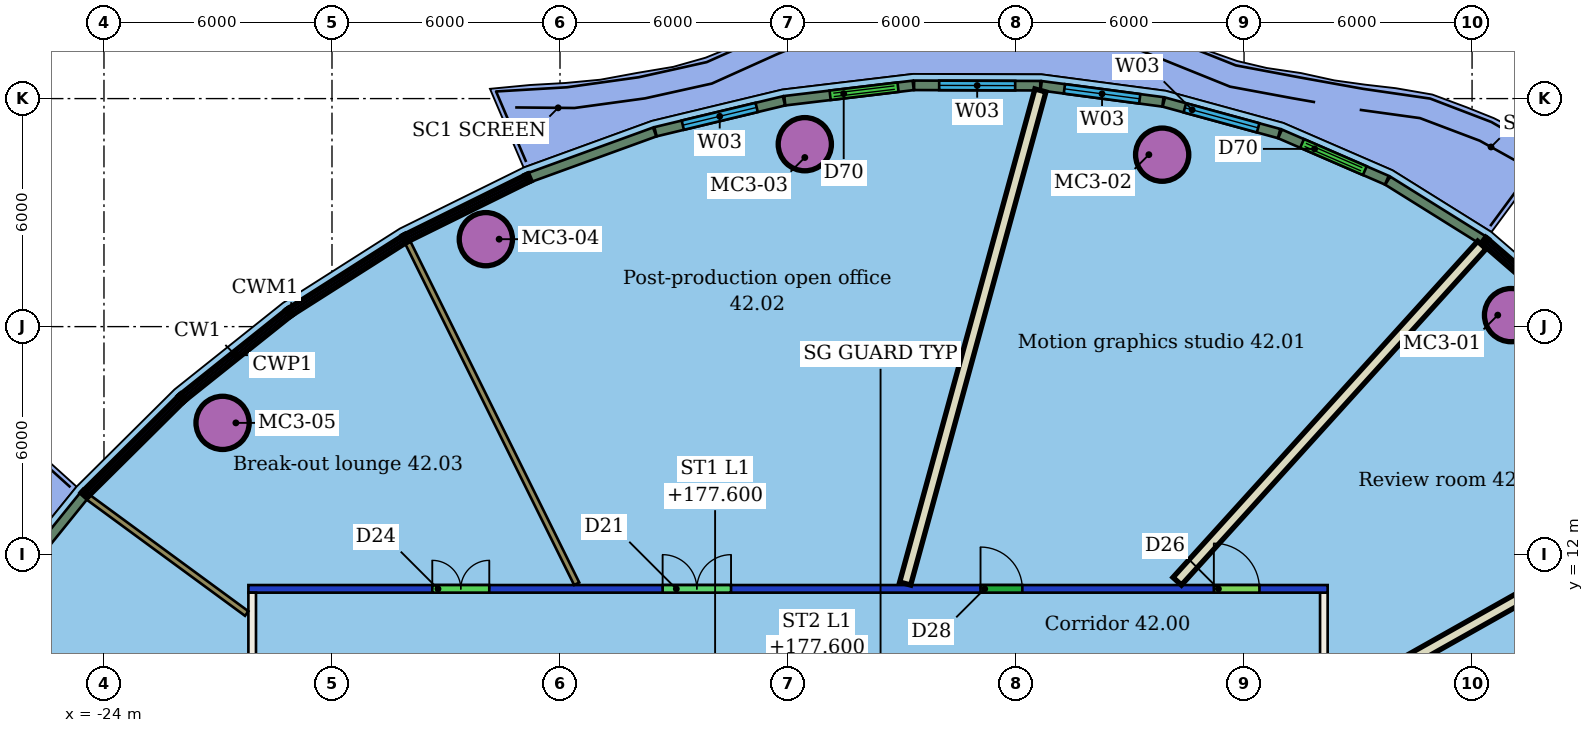
"""IFC4 building model, lengths in metres.
Left out: names, types, materials, properties, quantities, classifications, styles, units other than length and angle.
Written with IfcOpenShell. Run it as: python <this file> out.ifc"""

import sys

from ifc_helpers import new_model, si_unit, direction, frame, frame_2d, origin, origin_2d, place, context, subcontext, project, spatial, rectangle, hollow_circle, extrude, element, fill, save


model = new_model("IFC4")
c1 = context("Model", 3, precision=1e-05, world=origin(), true_north=direction((0.0, 1.0)))
c2 = subcontext(c1, "Body", "Model", "MODEL_VIEW")
j1 = project(units=[si_unit("LENGTHUNIT", "METRE"), si_unit("PLANEANGLEUNIT", "RADIAN")], contexts=[c1])
p1 = place(None, origin())
s1 = spatial("IfcSite", under=j1, at=p1, CompositionType="ELEMENT")
p2 = place(p1, origin())
s2 = spatial("IfcBuilding", under=s1, at=p2, CompositionType="ELEMENT")
p3 = place(p2, frame((0.0, 0.0, 175.8)))
s3 = spatial("IfcBuildingStorey", under=s2, at=p3, CompositionType="ELEMENT", Elevation=175.8)
for number, where, z_axis, x_axis in (
    (1, (13.026, 18.303, 0.0), (0.0, 0.0, 1.0), (1.0, 0.0, 0.0)),
    (2, (3.845, 22.524, 0.0), (0.0, 0.0, 1.0), (1.0, 0.0, 0.0)),
    (3, (-5.558, 22.8, 0.0), (0.0, 0.0, 1.0), (1.0, 0.0, 0.0)),
    (4, (-13.952, 20.301, 0.0), (0.0, 0.0, 1.0), (1.0, 0.0, 0.0)),
    (5, (-20.879, 15.467, 0.0), (0.0, 0.0, 1.0), (1.0, 0.0, 0.0)),
):
    element("IfcColumn", number, at=place(p3, frame(where, z_axis=z_axis, x_axis=x_axis)), inside=s3, PredefinedType="COLUMN", context=c2, shape_type="SweptSolid", body=[
        extrude(hollow_circle(Radius=0.7, WallThickness=0.05, at=origin_2d()), origin(), (0.0, 0.0, 1.0), 3.4),
    ])
p4 = place(p3, frame((-20.1, -11.0, 0.0), z_axis=(0.0, 0.0, 1.0), x_axis=(0.0, 1.0, 0.0)))
e6 = element("IfcWall", 6, at=p4, inside=s3, PredefinedType="PARTITIONING", context=c2, shape_type="SweptSolid", body=[
    extrude(rectangle(XDim=22.0, YDim=0.2, at=frame_2d((11.0, 0.0))), origin(), (0.0, 0.0, 1.0), 3.4),
])
p5 = place(p4, frame((16.019, 0.0, 0.0)))
e7 = element("IfcOpeningElement", 7, at=p5, cuts=e6, PredefinedType="OPENING", context=c2, shape_type="SweptSolid", body=[
    extrude(rectangle(XDim=0.9, YDim=2.1, at=frame_2d((0.45, 1.05))), frame((0.0, 0.11, 0.0), z_axis=(0.0, -1.0, 0.0), x_axis=(1.0, 0.0, 0.0)), (0.0, 0.0, 1.0), 0.22),
])
p6 = place(p4, frame((8.662, 0.0, 0.0)))
e8 = element("IfcOpeningElement", 8, at=p6, cuts=e6, PredefinedType="OPENING", context=c2, shape_type="SweptSolid", body=[
    extrude(rectangle(XDim=1.2, YDim=2.1, at=frame_2d((0.6, 1.05))), frame((0.0, 0.11, 0.0), z_axis=(0.0, -1.0, 0.0), x_axis=(1.0, 0.0, 0.0)), (0.0, 0.0, 1.0), 0.22),
])
p7 = place(p3, frame((-20.2, 11.1, 0.0), z_axis=(0.0, 0.0, 1.0), x_axis=(1.0, 0.0, 0.0)))
e9 = element("IfcWall", 9, at=p7, inside=s3, PredefinedType="PARTITIONING", context=c2, shape_type="SweptSolid", body=[
    extrude(rectangle(XDim=28.4, YDim=0.2, at=frame_2d((14.2, 0.0))), origin(), (0.0, 0.0, 1.0), 3.0),
])
p8 = place(p7, frame((19.265, 0.0, 0.0)))
e10 = element("IfcOpeningElement", 10, at=p8, cuts=e9, PredefinedType="OPENING", context=c2, shape_type="SweptSolid", body=[
    extrude(rectangle(XDim=1.1, YDim=2.1, at=frame_2d((0.55, 1.05))), frame((0.0, 0.11, 0.0), z_axis=(0.0, -1.0, 0.0), x_axis=(1.0, 0.0, 0.0)), (0.0, 0.0, 1.0), 0.22),
])
p9 = place(p7, frame((10.901, 0.0, 0.0)))
e11 = element("IfcOpeningElement", 11, at=p9, cuts=e9, PredefinedType="OPENING", context=c2, shape_type="SweptSolid", body=[
    extrude(rectangle(XDim=1.8, YDim=2.1, at=frame_2d((0.9, 1.05))), frame((0.0, 0.11, 0.0), z_axis=(0.0, -1.0, 0.0), x_axis=(1.0, 0.0, 0.0)), (0.0, 0.0, 1.0), 0.22),
])
p10 = place(p7, frame((4.839, 0.0, 0.0)))
e12 = element("IfcOpeningElement", 12, at=p10, cuts=e9, PredefinedType="OPENING", context=c2, shape_type="SweptSolid", body=[
    extrude(rectangle(XDim=1.5, YDim=2.1, at=frame_2d((0.75, 1.05))), frame((0.0, 0.11, 0.0), z_axis=(0.0, -1.0, 0.0), x_axis=(1.0, 0.0, 0.0)), (0.0, 0.0, 1.0), 0.22),
])
p11 = place(p7, frame((25.405, 0.0, 0.0)))
e13 = element("IfcOpeningElement", 13, at=p11, cuts=e9, PredefinedType="OPENING", context=c2, shape_type="SweptSolid", body=[
    extrude(rectangle(XDim=1.2, YDim=2.1, at=frame_2d((0.6, 1.05))), frame((0.0, 0.11, 0.0), z_axis=(0.0, -1.0, 0.0), x_axis=(1.0, 0.0, 0.0)), (0.0, 0.0, 1.0), 0.22),
])
p12 = place(p3, frame((8.1, 11.0, 0.0), z_axis=(0.0, 0.0, 1.0), x_axis=(0.0, -1.0, 0.0)))
e14 = element("IfcWall", 14, at=p12, inside=s3, PredefinedType="PARTITIONING", context=c2, shape_type="SweptSolid", body=[
    extrude(rectangle(XDim=22.0, YDim=0.2, at=frame_2d((11.0, 0.0))), origin(), (0.0, 0.0, 1.0), 3.4),
])
p13 = place(p12, frame((15.112, 0.0, 0.0)))
e15 = element("IfcOpeningElement", 15, at=p13, cuts=e14, PredefinedType="OPENING", context=c2, shape_type="SweptSolid", body=[
    extrude(rectangle(XDim=0.9, YDim=2.1, at=frame_2d((0.45, 1.05))), frame((0.0, 0.11, 0.0), z_axis=(0.0, -1.0, 0.0), x_axis=(1.0, 0.0, 0.0)), (0.0, 0.0, 1.0), 0.22),
])
p14 = place(p12, frame((11.66, 0.0, 0.0)))
e16 = element("IfcOpeningElement", 16, at=p14, cuts=e14, PredefinedType="OPENING", context=c2, shape_type="SweptSolid", body=[
    extrude(rectangle(XDim=1.2, YDim=2.1, at=frame_2d((0.6, 1.05))), frame((0.0, 0.11, 0.0), z_axis=(0.0, -1.0, 0.0), x_axis=(1.0, 0.0, 0.0)), (0.0, 0.0, 1.0), 0.22),
])
p15 = place(p12, frame((5.034, 0.0, 0.0)))
e17 = element("IfcOpeningElement", 17, at=p15, cuts=e14, PredefinedType="OPENING", context=c2, shape_type="SweptSolid", body=[
    extrude(rectangle(XDim=1.0, YDim=2.1, at=frame_2d((0.5, 1.05))), frame((0.0, 0.11, 0.0), z_axis=(0.0, -1.0, 0.0), x_axis=(1.0, 0.0, 0.0)), (0.0, 0.0, 1.0), 0.22),
])
p16 = place(p3, frame((12.258, 20.146, 0.0), z_axis=(0.0, 0.0, 1.0), x_axis=(-0.671538022576, -0.740970096721, 0.0)))
e18 = element("IfcWall", 18, at=p16, inside=s3, PredefinedType="PARTITIONING", context=c2, shape_type="SweptSolid", body=[
    extrude(rectangle(XDim=11.938, YDim=0.3, at=frame_2d((5.969, 0.0))), origin(), (0.0, 0.0, 1.0), 3.4),
])
p17 = place(p3, frame((0.641, 24.214, 0.0), z_axis=(0.0, 0.0, 1.0), x_axis=(-0.264514468867, -0.964381716832, 0.0)))
e19 = element("IfcWall", 19, at=p17, inside=s3, PredefinedType="PARTITIONING", context=c2, shape_type="SweptSolid", body=[
    extrude(rectangle(XDim=13.453, YDim=0.3, at=frame_2d((6.727, 0.0))), origin(), (0.0, 0.0, 1.0), 3.4),
])
p18 = place(p3, frame((-16.004, 20.209, 0.0), z_axis=(0.0, 0.0, 1.0), x_axis=(0.443651290201, -0.896199493809, 0.0)))
e20 = element("IfcWall", 20, at=p18, inside=s3, PredefinedType="PARTITIONING", context=c2, shape_type="SweptSolid", body=[
    extrude(rectangle(XDim=10.016, YDim=0.15, at=frame_2d((5.008, 0.0))), origin(), (0.0, 0.0, 1.0), 3.4),
])
p19 = place(p3, frame((-24.406, 13.504, 0.0), z_axis=(0.0, 0.0, 1.0), x_axis=(0.806278661404, -0.591535899303, 0.0)))
e21 = element("IfcWall", 21, at=p19, inside=s3, PredefinedType="PARTITIONING", context=c2, shape_type="SweptSolid", body=[
    extrude(rectangle(XDim=5.162, YDim=0.15, at=frame_2d((2.581, 0.0))), origin(), (0.0, 0.0, 1.0), 3.4),
])
p20 = place(p3, frame((17.885, 13.463, 0.0), z_axis=(0.0, 0.0, 1.0), x_axis=(-0.871144981066, -0.491025887265, 0.0)))
e22 = element("IfcWall", 22, at=p20, inside=s3, PredefinedType="PARTITIONING", context=c2, shape_type="SweptSolid", body=[
    extrude(rectangle(XDim=11.033, YDim=0.3, at=frame_2d((5.517, 0.0))), origin(), (0.0, 0.0, 1.0), 3.4),
])
p21 = place(p3, frame((12.286, 20.276, 0.0), z_axis=(0.0, 0.0, 1.0), x_axis=(-0.848248973031, 0.529597658371, 0.0)))
e23 = element("IfcWall", 23, at=p21, inside=s3, PredefinedType="SOLIDWALL", context=c2, shape_type="SweptSolid", body=[
    extrude(rectangle(XDim=2.954, YDim=0.25, at=frame_2d((1.477, 0.0))), origin(), (0.0, 0.0, 1.0), 3.05),
])
p22 = place(p3, frame((9.757, 21.853, 0.0), z_axis=(0.0, 0.0, 1.0), x_axis=(-0.917458663887, 0.397831120023, 0.0)))
e24 = element("IfcWall", 24, at=p22, inside=s3, PredefinedType="SOLIDWALL", context=c2, shape_type="SweptSolid", body=[
    extrude(rectangle(XDim=3.063, YDim=0.25, at=frame_2d((1.531, 0.0))), origin(), (0.0, 0.0, 1.0), 3.05),
])
p23 = place(p22, frame((0.631, 0.0, 0.0)))
e25 = element("IfcOpeningElement", 25, at=p23, cuts=e24, PredefinedType="OPENING", context=c2, shape_type="SweptSolid", body=[
    extrude(rectangle(XDim=1.8, YDim=2.4, at=frame_2d((0.9, 1.2))), frame((0.0, 0.135, 0.0), z_axis=(0.0, -1.0, 0.0), x_axis=(1.0, 0.0, 0.0)), (0.0, 0.0, 1.0), 0.27),
])
p24 = place(p3, frame((6.922, 23.08, 0.0), z_axis=(0.0, 0.0, 1.0), x_axis=(-0.964636462647, 0.263583942857, 0.0)))
e26 = element("IfcWall", 26, at=p24, inside=s3, PredefinedType="SOLIDWALL", context=c2, shape_type="SweptSolid", body=[
    extrude(rectangle(XDim=3.144, YDim=0.25, at=frame_2d((1.572, 0.0))), origin(), (0.0, 0.0, 1.0), 3.05),
])
p25 = place(p24, frame((0.572, 0.0, 0.9)))
e27 = element("IfcOpeningElement", 27, at=p25, cuts=e26, PredefinedType="OPENING", context=c2, shape_type="SweptSolid", body=[
    extrude(rectangle(XDim=2.0, YDim=2.1, at=frame_2d((1.0, 1.05))), frame((0.0, 0.135, 0.0), z_axis=(0.0, -1.0, 0.0), x_axis=(1.0, 0.0, 0.0)), (0.0, 0.0, 1.0), 0.27),
])
p26 = place(p3, frame((3.865, 23.913, 0.0), z_axis=(0.0, 0.0, 1.0), x_axis=(-0.991363289686, 0.131144301676, 0.0)))
e28 = element("IfcWall", 28, at=p26, inside=s3, PredefinedType="SOLIDWALL", context=c2, shape_type="SweptSolid", body=[
    extrude(rectangle(XDim=3.232, YDim=0.25, at=frame_2d((1.616, 0.0))), origin(), (0.0, 0.0, 1.0), 3.05),
])
p27 = place(p26, frame((0.616, 0.0, 0.9)))
e29 = element("IfcOpeningElement", 29, at=p27, cuts=e28, PredefinedType="OPENING", context=c2, shape_type="SweptSolid", body=[
    extrude(rectangle(XDim=2.0, YDim=2.1, at=frame_2d((1.0, 1.05))), frame((0.0, 0.135, 0.0), z_axis=(0.0, -1.0, 0.0), x_axis=(1.0, 0.0, 0.0)), (0.0, 0.0, 1.0), 0.27),
])
p28 = place(p3, frame((0.638, 24.339, 0.0), z_axis=(0.0, 0.0, 1.0), x_axis=(-0.999994765707, 0.003235515089, 0.0)))
e30 = element("IfcWall", 30, at=p28, inside=s3, PredefinedType="SOLIDWALL", context=c2, shape_type="SweptSolid", body=[
    extrude(rectangle(XDim=3.32, YDim=0.25, at=frame_2d((1.66, 0.0))), origin(), (0.0, 0.0, 1.0), 3.05),
])
p29 = place(p28, frame((0.66, 0.0, 0.9)))
e31 = element("IfcOpeningElement", 31, at=p29, cuts=e30, PredefinedType="OPENING", context=c2, shape_type="SweptSolid", body=[
    extrude(rectangle(XDim=2.0, YDim=2.1, at=frame_2d((1.0, 1.05))), frame((0.0, 0.135, 0.0), z_axis=(0.0, -1.0, 0.0), x_axis=(1.0, 0.0, 0.0)), (0.0, 0.0, 1.0), 0.27),
])
p30 = place(p3, frame((-2.706, 24.348, 0.0), z_axis=(0.0, 0.0, 1.0), x_axis=(-0.992928000629, -0.118718092836, 0.0)))
e32 = element("IfcWall", 32, at=p30, inside=s3, PredefinedType="SOLIDWALL", context=c2, shape_type="SweptSolid", body=[
    extrude(rectangle(XDim=3.404, YDim=0.25, at=frame_2d((1.702, 0.0))), origin(), (0.0, 0.0, 1.0), 3.05),
])
p31 = place(p30, frame((0.402, 0.0, 0.0)))
e33 = element("IfcOpeningElement", 33, at=p31, cuts=e32, PredefinedType="OPENING", context=c2, shape_type="SweptSolid", body=[
    extrude(rectangle(XDim=1.8, YDim=2.4, at=frame_2d((0.9, 1.2))), frame((0.0, 0.135, 0.0), z_axis=(0.0, -1.0, 0.0), x_axis=(1.0, 0.0, 0.0)), (0.0, 0.0, 1.0), 0.27),
])
p32 = place(p3, frame((-6.107, 23.94, 0.0), z_axis=(0.0, 0.0, 1.0), x_axis=(-0.97230053317, -0.233734193469, 0.0)))
e34 = element("IfcWall", 34, at=p32, inside=s3, PredefinedType="SOLIDWALL", context=c2, shape_type="SweptSolid", body=[
    extrude(rectangle(XDim=3.476, YDim=0.25, at=frame_2d((1.738, 0.0))), origin(), (0.0, 0.0, 1.0), 3.05),
])
p33 = place(p32, frame((0.738, 0.0, 0.9)))
e35 = element("IfcOpeningElement", 35, at=p33, cuts=e34, PredefinedType="OPENING", context=c2, shape_type="SweptSolid", body=[
    extrude(rectangle(XDim=2.0, YDim=2.1, at=frame_2d((1.0, 1.05))), frame((0.0, 0.135, 0.0), z_axis=(0.0, -1.0, 0.0), x_axis=(1.0, 0.0, 0.0)), (0.0, 0.0, 1.0), 0.27),
])
p34 = place(p3, frame((-9.508, 23.121, 0.0), z_axis=(0.0, 0.0, 1.0), x_axis=(-0.939842425933, -0.341608276271, 0.0)))
e36 = element("IfcWall", 36, at=p34, inside=s3, PredefinedType="SOLIDWALL", context=c2, shape_type="SweptSolid", body=[
    extrude(rectangle(XDim=3.49, YDim=0.25, at=frame_2d((1.745, 0.0))), origin(), (0.0, 0.0, 1.0), 3.05),
])
p35 = place(p3, frame((-24.533, 13.545, 0.0), z_axis=(0.0, 0.0, 1.0), x_axis=(-0.628441308027, -0.777857006374, 0.0)))
e37 = element("IfcWall", 37, at=p35, inside=s3, PredefinedType="SOLIDWALL", context=c2, shape_type="SweptSolid", body=[
    extrude(rectangle(XDim=3.49, YDim=0.25, at=frame_2d((1.745, 0.0))), origin(), (0.0, 0.0, 1.0), 3.05),
])
p36 = place(p8, origin())
e38 = element("IfcDoor", 38, at=p36, inside=s3, OperationType="SINGLE_SWING_LEFT", PredefinedType="DOOR", context=c2, shape_type="SweptSolid", body=[
    extrude(rectangle(XDim=1.1, YDim=2.1, at=frame_2d((0.55, 1.05))), frame((0.0, 0.025, 0.0), z_axis=(0.0, -1.0, 0.0), x_axis=(1.0, 0.0, 0.0)), (0.0, 0.0, 1.0), 0.05),
])
fill(e10, e38)
p37 = place(p9, origin())
e39 = element("IfcDoor", 39, at=p37, inside=s3, OperationType="DOUBLE_DOOR_SINGLE_SWING", PredefinedType="DOOR", context=c2, shape_type="SweptSolid", body=[
    extrude(rectangle(XDim=1.8, YDim=2.1, at=frame_2d((0.9, 1.05))), frame((0.0, 0.025, 0.0), z_axis=(0.0, -1.0, 0.0), x_axis=(1.0, 0.0, 0.0)), (0.0, 0.0, 1.0), 0.05),
])
fill(e11, e39)
p38 = place(p10, origin())
e40 = element("IfcDoor", 40, at=p38, inside=s3, OperationType="DOUBLE_DOOR_SINGLE_SWING", PredefinedType="DOOR", context=c2, shape_type="SweptSolid", body=[
    extrude(rectangle(XDim=1.5, YDim=2.1, at=frame_2d((0.75, 1.05))), frame((0.0, 0.025, 0.0), z_axis=(0.0, -1.0, 0.0), x_axis=(1.0, 0.0, 0.0)), (0.0, 0.0, 1.0), 0.05),
])
fill(e12, e40)
p39 = place(p11, origin())
e41 = element("IfcDoor", 41, at=p39, inside=s3, OperationType="SINGLE_SWING_LEFT", PredefinedType="DOOR", context=c2, shape_type="SweptSolid", body=[
    extrude(rectangle(XDim=1.2, YDim=2.1, at=frame_2d((0.6, 1.05))), frame((0.0, 0.025, 0.0), z_axis=(0.0, -1.0, 0.0), x_axis=(1.0, 0.0, 0.0)), (0.0, 0.0, 1.0), 0.05),
])
fill(e13, e41)
p40 = place(p23, origin())
e42 = element("IfcDoor", 42, at=p40, inside=s3, OperationType="DOUBLE_DOOR_SLIDING", PredefinedType="DOOR", context=c2, shape_type="SweptSolid", body=[
    extrude(rectangle(XDim=1.8, YDim=2.4, at=frame_2d((0.9, 1.2))), frame((0.0, 0.025, 0.0), z_axis=(0.0, -1.0, 0.0), x_axis=(1.0, 0.0, 0.0)), (0.0, 0.0, 1.0), 0.05),
])
fill(e25, e42)
p41 = place(p25, origin())
e43 = element("IfcWindow", 43, at=p41, inside=s3, PartitioningType="SINGLE_PANEL", PredefinedType="WINDOW", context=c2, shape_type="SweptSolid", body=[
    extrude(rectangle(XDim=2.0, YDim=2.1, at=frame_2d((1.0, 1.05))), frame((0.0, 0.03, 0.0), z_axis=(0.0, -1.0, 0.0), x_axis=(1.0, 0.0, 0.0)), (0.0, 0.0, 1.0), 0.06),
])
fill(e27, e43)
p42 = place(p27, origin())
e44 = element("IfcWindow", 44, at=p42, inside=s3, PartitioningType="SINGLE_PANEL", PredefinedType="WINDOW", context=c2, shape_type="SweptSolid", body=[
    extrude(rectangle(XDim=2.0, YDim=2.1, at=frame_2d((1.0, 1.05))), frame((0.0, 0.03, 0.0), z_axis=(0.0, -1.0, 0.0), x_axis=(1.0, 0.0, 0.0)), (0.0, 0.0, 1.0), 0.06),
])
fill(e29, e44)
p43 = place(p29, origin())
e45 = element("IfcWindow", 45, at=p43, inside=s3, PartitioningType="SINGLE_PANEL", PredefinedType="WINDOW", context=c2, shape_type="SweptSolid", body=[
    extrude(rectangle(XDim=2.0, YDim=2.1, at=frame_2d((1.0, 1.05))), frame((0.0, 0.03, 0.0), z_axis=(0.0, -1.0, 0.0), x_axis=(1.0, 0.0, 0.0)), (0.0, 0.0, 1.0), 0.06),
])
fill(e31, e45)
p44 = place(p31, origin())
e46 = element("IfcDoor", 46, at=p44, inside=s3, OperationType="DOUBLE_DOOR_SLIDING", PredefinedType="DOOR", context=c2, shape_type="SweptSolid", body=[
    extrude(rectangle(XDim=1.8, YDim=2.4, at=frame_2d((0.9, 1.2))), frame((0.0, 0.025, 0.0), z_axis=(0.0, -1.0, 0.0), x_axis=(1.0, 0.0, 0.0)), (0.0, 0.0, 1.0), 0.05),
])
fill(e33, e46)
p45 = place(p33, origin())
e47 = element("IfcWindow", 47, at=p45, inside=s3, PartitioningType="SINGLE_PANEL", PredefinedType="WINDOW", context=c2, shape_type="SweptSolid", body=[
    extrude(rectangle(XDim=2.0, YDim=2.1, at=frame_2d((1.0, 1.05))), frame((0.0, 0.03, 0.0), z_axis=(0.0, -1.0, 0.0), x_axis=(1.0, 0.0, 0.0)), (0.0, 0.0, 1.0), 0.06),
])
fill(e35, e47)
save(model, sys.argv[1])
